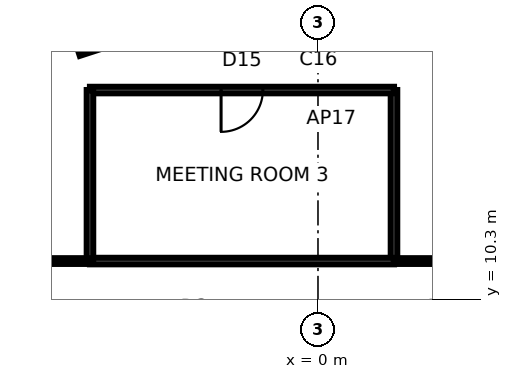
"""IFC4 building model, lengths in metres.
Left out: names, types, materials, properties, quantities, classifications, styles, units other than length and angle.
Written with IfcOpenShell. Run it as: python <this file> out.ifc"""

import sys

from ifc_helpers import new_model, si_unit, direction, frame, frame_2d, origin, origin_2d, place, context, subcontext, project, spatial, rectangle, extrude, element, fill, save


model = new_model("IFC4")
c1 = context("Model", 3, precision=1e-05, world=origin(), true_north=direction((0.0, 1.0)))
c2 = subcontext(c1, "Body", "Model", "MODEL_VIEW")
j1 = project(units=[si_unit("LENGTHUNIT", "METRE"), si_unit("PLANEANGLEUNIT", "RADIAN")], contexts=[c1])
p1 = place(None, origin())
s1 = spatial("IfcSite", under=j1, at=p1, CompositionType="ELEMENT")
p2 = place(p1, origin())
s2 = spatial("IfcBuilding", under=s1, at=p2, CompositionType="ELEMENT")
p3 = place(p2, frame((0.0, 0.0, 147.0)))
s3 = spatial("IfcBuildingStorey", under=s2, at=p3, CompositionType="ELEMENT", Elevation=147.0)
p4 = place(p3, frame((-5.754, 17.708, 0.0), z_axis=(0.0, 0.0, 1.0), x_axis=(-0.309016994375, 0.951056516295, 0.0)))
e1 = element("IfcColumn", 1, at=p4, inside=s3, PredefinedType="COLUMN", context=c2, shape_type="SweptSolid", body=[
    extrude(rectangle(XDim=1.6, YDim=1.6, at=origin_2d()), origin(), (0.0, 0.0, 1.0), 3.9),
])
p5 = place(p3, frame((9.0, 11.3, 0.0), z_axis=(0.0, 0.0, 1.0), x_axis=(-1.0, 0.0, 0.0)))
e2 = element("IfcWall", 2, at=p5, inside=s3, PredefinedType="PARTITIONING", context=c2, shape_type="SweptSolid", body=[
    extrude(rectangle(XDim=7.0, YDim=0.15, at=frame_2d((3.5, 0.0))), origin(), (0.0, 0.0, 1.0), 3.74),
])
p6 = place(p3, frame((2.0, 11.3, 0.0), z_axis=(0.0, 0.0, 1.0), x_axis=(0.0, 1.0, 0.0)))
e3 = element("IfcWall", 3, at=p6, inside=s3, PredefinedType="PARTITIONING", context=c2, shape_type="SweptSolid", body=[
    extrude(rectangle(XDim=4.5, YDim=0.17, at=frame_2d((2.25, 0.0))), origin(), (0.0, 0.0, 1.0), 3.74),
])
p7 = place(p3, frame((2.0, 15.8, 0.0), z_axis=(0.0, 0.0, 1.0), x_axis=(-1.0, 0.0, 0.0)))
e4 = element("IfcWall", 4, at=p7, inside=s3, PredefinedType="PARTITIONING", context=c2, shape_type="SweptSolid", body=[
    extrude(rectangle(XDim=8.0, YDim=0.17, at=frame_2d((4.0, 0.0))), origin(), (0.0, 0.0, 1.0), 3.74),
])
p8 = place(p7, frame((3.45, 0.0, 0.0)))
e5 = element("IfcOpeningElement", 5, at=p8, cuts=e4, PredefinedType="OPENING", context=c2, shape_type="SweptSolid", body=[
    extrude(rectangle(XDim=1.1, YDim=2.4, at=frame_2d((0.55, 1.2))), frame((0.0, 0.095, 0.0), z_axis=(0.0, -1.0, 0.0), x_axis=(1.0, 0.0, 0.0)), (0.0, 0.0, 1.0), 0.19),
])
p9 = place(p3, frame((-6.0, 11.3, 0.0), z_axis=(0.0, 0.0, 1.0), x_axis=(1.0, 0.0, 0.0)))
e6 = element("IfcWall", 6, at=p9, inside=s3, PredefinedType="PARTITIONING", context=c2, shape_type="SweptSolid", body=[
    extrude(rectangle(XDim=8.0, YDim=0.17, at=frame_2d((4.0, 0.0))), origin(), (0.0, 0.0, 1.0), 3.74),
])
p10 = place(p3, frame((-6.0, 15.8, 0.0), z_axis=(0.0, 0.0, 1.0), x_axis=(0.0, -1.0, 0.0)))
e7 = element("IfcWall", 7, at=p10, inside=s3, PredefinedType="PARTITIONING", context=c2, shape_type="SweptSolid", body=[
    extrude(rectangle(XDim=4.5, YDim=0.17, at=frame_2d((2.25, 0.0))), origin(), (0.0, 0.0, 1.0), 3.74),
])
p11 = place(p3, frame((-6.0, 11.3, 0.0), z_axis=(0.0, 0.0, 1.0), x_axis=(-1.0, 0.0, 0.0)))
e8 = element("IfcWall", 8, at=p11, inside=s3, PredefinedType="PARTITIONING", context=c2, shape_type="SweptSolid", body=[
    extrude(rectangle(XDim=10.0, YDim=0.15, at=frame_2d((5.0, 0.0))), origin(), (0.0, 0.0, 1.0), 3.74),
])
p12 = place(p8, origin())
e9 = element("IfcDoor", 9, at=p12, inside=s3, OperationType="SINGLE_SWING_RIGHT", PredefinedType="DOOR", context=c2, shape_type="SweptSolid", body=[
    extrude(rectangle(XDim=1.1, YDim=2.4, at=frame_2d((0.55, 1.2))), frame((0.0, 0.025, 0.0), z_axis=(0.0, -1.0, 0.0), x_axis=(1.0, 0.0, 0.0)), (0.0, 0.0, 1.0), 0.05),
])
fill(e5, e9)
save(model, sys.argv[1])
